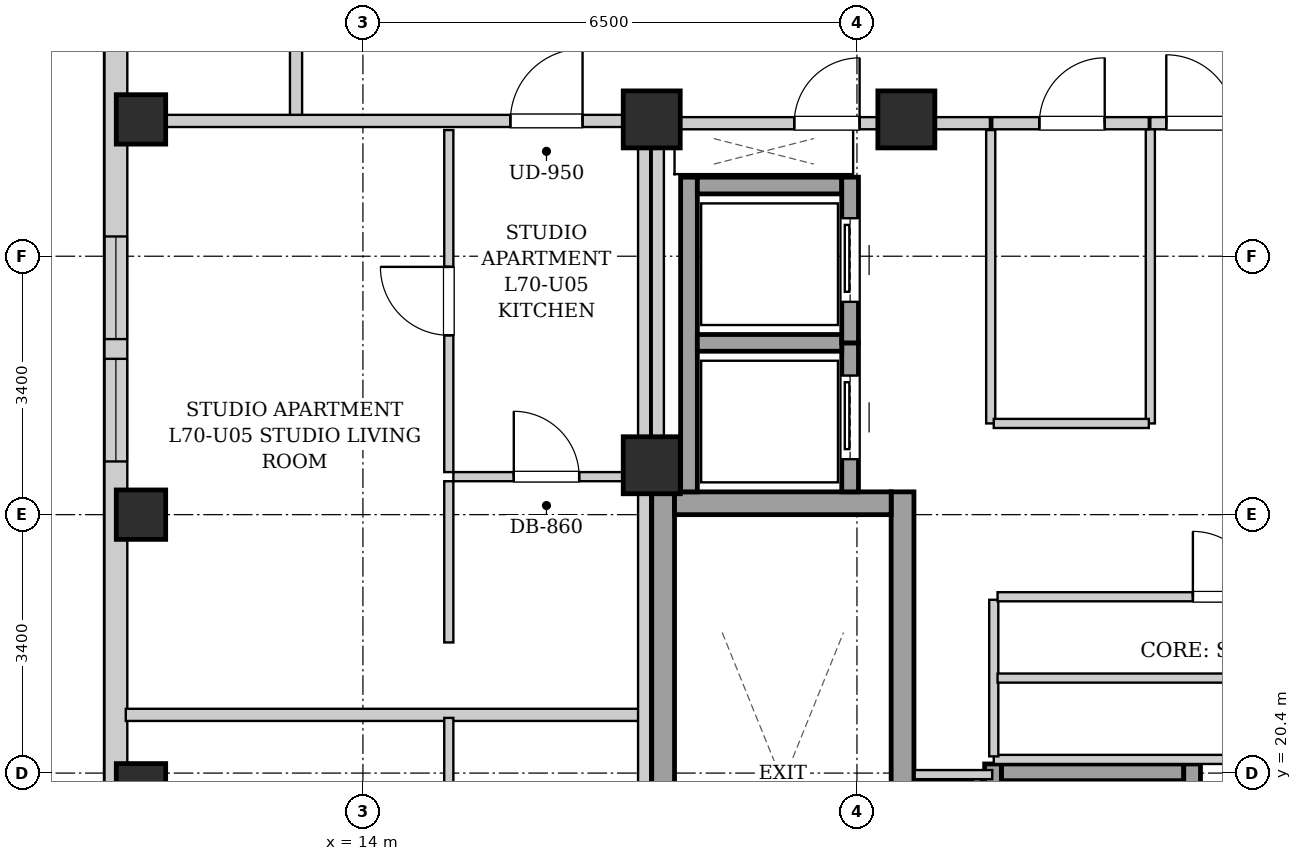
"""IFC4 building model, lengths in metres.
Left out: names, types, materials, properties, quantities, classifications, styles, units other than length and angle.
Written with IfcOpenShell. Run it as: python <this file> out.ifc"""

import sys

from ifc_helpers import new_model, si_unit, direction, frame, frame_2d, origin, origin_2d, place, context, subcontext, project, spatial, rectangle, extrude, element, fill, save


model = new_model("IFC4")
c1 = context("Model", 3, precision=1e-05, world=origin(), true_north=direction((0.0, 1.0)))
c2 = subcontext(c1, "Body", "Model", "MODEL_VIEW")
j1 = project(units=[si_unit("LENGTHUNIT", "METRE"), si_unit("PLANEANGLEUNIT", "RADIAN")], contexts=[c1])
p1 = place(None, origin())
s1 = spatial("IfcSite", under=j1, at=p1, CompositionType="ELEMENT")
p2 = place(p1, origin())
s2 = spatial("IfcBuilding", under=s1, at=p2, CompositionType="ELEMENT")
p3 = place(p2, frame((0.0, 0.0, 241.1)))
s3 = spatial("IfcBuildingStorey", under=s2, at=p3, CompositionType="ELEMENT", Elevation=241.1)
for number, where, z_axis, x_axis in (
    (1, (11.08, 20.2, 0.0), (0.0, 0.0, 1.0), (1.0, 0.0, 0.0)),
    (2, (11.08, 23.8, 0.0), (0.0, 0.0, 1.0), (1.0, 0.0, 0.0)),
    (3, (11.08, 29.0, 0.0), (0.0, 0.0, 1.0), (1.0, 0.0, 0.0)),
):
    element("IfcColumn", number, at=place(p3, frame(where, z_axis=z_axis, x_axis=x_axis)), inside=s3, PredefinedType="COLUMN", context=c2, shape_type="SweptSolid", body=[
        extrude(rectangle(XDim=0.65, YDim=0.65, at=origin_2d()), origin(), (0.0, 0.0, 1.0), 3.4),
    ])
for number, where, z_axis, x_axis in (
    (4, (17.8, 29.0, 0.0), (0.0, 0.0, 1.0), (1.0, 0.0, 0.0)),
    (5, (21.15, 29.0, 0.0), (0.0, 0.0, 1.0), (1.0, 0.0, 0.0)),
    (6, (17.8, 24.45, 0.0), (0.0, 0.0, 1.0), (1.0, 0.0, 0.0)),
):
    element("IfcColumn", number, at=place(p3, frame(where, z_axis=z_axis, x_axis=x_axis)), inside=s3, PredefinedType="COLUMN", context=c2, shape_type="SweptSolid", body=[
        extrude(rectangle(XDim=0.75, YDim=0.75, at=origin_2d()), origin(), (0.0, 0.0, 1.0), 3.4),
    ])
p4 = place(p3, frame((10.75, 6.3, 0.0), z_axis=(0.0, 0.0, 1.0), x_axis=(0.0, 1.0, 0.0)))
e7 = element("IfcWall", 7, at=p4, inside=s3, PredefinedType="SOLIDWALL", context=c2, shape_type="SweptSolid", body=[
    extrude(rectangle(XDim=31.4, YDim=0.3, at=frame_2d((15.7, 0.0))), origin(), (0.0, 0.0, 1.0), 3.14),
])
p5 = place(p4, frame((1.653, 0.0, 0.55)))
e8 = element("IfcOpeningElement", 8, at=p5, cuts=e7, PredefinedType="OPENING", context=c2, shape_type="SweptSolid", body=[
    extrude(rectangle(XDim=1.35, YDim=1.2, at=frame_2d((0.675, 0.6))), frame((0.0, 0.16, 0.0), z_axis=(0.0, -1.0, 0.0), x_axis=(1.0, 0.0, 0.0)), (0.0, 0.0, 1.0), 0.32),
])
p6 = place(p4, frame((11.194, 0.0, 0.55)))
e9 = element("IfcOpeningElement", 9, at=p6, cuts=e7, PredefinedType="OPENING", context=c2, shape_type="SweptSolid", body=[
    extrude(rectangle(XDim=1.35, YDim=1.2, at=frame_2d((0.675, 0.6))), frame((0.0, 0.16, 0.0), z_axis=(0.0, -1.0, 0.0), x_axis=(1.0, 0.0, 0.0)), (0.0, 0.0, 1.0), 0.32),
])
p7 = place(p4, frame((9.185, 0.0, 0.55)))
e10 = element("IfcOpeningElement", 10, at=p7, cuts=e7, PredefinedType="OPENING", context=c2, shape_type="SweptSolid", body=[
    extrude(rectangle(XDim=1.35, YDim=1.2, at=frame_2d((0.675, 0.6))), frame((0.0, 0.16, 0.0), z_axis=(0.0, -1.0, 0.0), x_axis=(1.0, 0.0, 0.0)), (0.0, 0.0, 1.0), 0.32),
])
p8 = place(p4, frame((18.2, 0.0, 0.55)))
e11 = element("IfcOpeningElement", 11, at=p8, cuts=e7, PredefinedType="OPENING", context=c2, shape_type="SweptSolid", body=[
    extrude(rectangle(XDim=1.35, YDim=1.2, at=frame_2d((0.675, 0.6))), frame((0.0, 0.16, 0.0), z_axis=(0.0, -1.0, 0.0), x_axis=(1.0, 0.0, 0.0)), (0.0, 0.0, 1.0), 0.32),
])
p9 = place(p4, frame((19.81, 0.0, 0.55)))
e12 = element("IfcOpeningElement", 12, at=p9, cuts=e7, PredefinedType="OPENING", context=c2, shape_type="SweptSolid", body=[
    extrude(rectangle(XDim=1.35, YDim=1.2, at=frame_2d((0.675, 0.6))), frame((0.0, 0.16, 0.0), z_axis=(0.0, -1.0, 0.0), x_axis=(1.0, 0.0, 0.0)), (0.0, 0.0, 1.0), 0.32),
])
for number, where, z_axis, x_axis in (
    (13, (17.95, 15.1, 0.0), (0.0, 0.0, 1.0), (0.0, 1.0, 0.0)),
    (14, (21.1, 15.1, 0.0), (0.0, 0.0, 1.0), (0.0, 1.0, 0.0)),
):
    element("IfcWall", number, at=place(p3, frame(where, z_axis=z_axis, x_axis=x_axis)), inside=s3, PredefinedType="SHEAR", context=c2, shape_type="SweptSolid", body=[
        extrude(rectangle(XDim=9.0, YDim=0.3, at=frame_2d((4.5, 0.0))), origin(), (0.0, 0.0, 1.0), 3.14),
    ])
p10 = place(p3, frame((18.1, 23.95, 0.0), z_axis=(0.0, 0.0, 1.0), x_axis=(1.0, 0.0, 0.0)))
e15 = element("IfcWall", 15, at=p10, inside=s3, PredefinedType="SHEAR", context=c2, shape_type="SweptSolid", body=[
    extrude(rectangle(XDim=2.85, YDim=0.3, at=frame_2d((1.425, 0.0))), origin(), (0.0, 0.0, 1.0), 3.14),
])
p11 = place(p3, frame((18.29, 24.1, 0.0), z_axis=(0.0, 0.0, 1.0), x_axis=(0.0, 1.0, 0.0)))
e16 = element("IfcWall", 16, at=p11, inside=s3, PredefinedType="SHEAR", context=c2, shape_type="SweptSolid", body=[
    extrude(rectangle(XDim=4.14, YDim=0.22, at=frame_2d((2.07, 0.0))), origin(), (0.0, 0.0, 1.0), 3.14),
])
p12 = place(p3, frame((20.41, 24.1, 0.0), z_axis=(0.0, 0.0, 1.0), x_axis=(0.0, 1.0, 0.0)))
e17 = element("IfcWall", 17, at=p12, inside=s3, PredefinedType="SHEAR", context=c2, shape_type="SweptSolid", body=[
    extrude(rectangle(XDim=1.96, YDim=0.22, at=frame_2d((0.98, 0.0))), origin(), (0.0, 0.0, 1.0), 3.14),
])
p13 = place(p12, frame((0.43, 0.0, 0.0)))
e18 = element("IfcOpeningElement", 18, at=p13, cuts=e17, PredefinedType="OPENING", context=c2, shape_type="SweptSolid", body=[
    extrude(rectangle(XDim=1.1, YDim=2.15, at=frame_2d((0.55, 1.075))), frame((0.0, 0.12, 0.0), z_axis=(0.0, -1.0, 0.0), x_axis=(1.0, 0.0, 0.0)), (0.0, 0.0, 1.0), 0.24),
])
for number, where, z_axis, x_axis in (
    (19, (18.4, 26.06, 0.0), (0.0, 0.0, 1.0), (1.0, 0.0, 0.0)),
    (20, (18.4, 28.13, 0.0), (0.0, 0.0, 1.0), (1.0, 0.0, 0.0)),
):
    element("IfcWall", number, at=place(p3, frame(where, z_axis=z_axis, x_axis=x_axis)), inside=s3, PredefinedType="SHEAR", context=c2, shape_type="SweptSolid", body=[
        extrude(rectangle(XDim=1.9, YDim=0.22, at=frame_2d((0.95, 0.0))), origin(), (0.0, 0.0, 1.0), 3.14),
    ])
p14 = place(p3, frame((20.41, 26.06, 0.0), z_axis=(0.0, 0.0, 1.0), x_axis=(0.0, 1.0, 0.0)))
e21 = element("IfcWall", 21, at=p14, inside=s3, PredefinedType="SHEAR", context=c2, shape_type="SweptSolid", body=[
    extrude(rectangle(XDim=2.18, YDim=0.22, at=frame_2d((1.09, 0.0))), origin(), (0.0, 0.0, 1.0), 3.14),
])
p15 = place(p14, frame((0.54, 0.0, 0.0)))
e22 = element("IfcOpeningElement", 22, at=p15, cuts=e21, PredefinedType="OPENING", context=c2, shape_type="SweptSolid", body=[
    extrude(rectangle(XDim=1.1, YDim=2.15, at=frame_2d((0.55, 1.075))), frame((0.0, 0.12, 0.0), z_axis=(0.0, -1.0, 0.0), x_axis=(1.0, 0.0, 0.0)), (0.0, 0.0, 1.0), 0.24),
])
p16 = place(p3, frame((22.4, 20.41, 0.0), z_axis=(0.0, 0.0, 1.0), x_axis=(1.0, 0.0, 0.0)))
e23 = element("IfcWall", 23, at=p16, inside=s3, PredefinedType="SHEAR", context=c2, shape_type="SweptSolid", body=[
    extrude(rectangle(XDim=2.4, YDim=0.22, at=frame_2d((1.2, 0.0))), origin(), (0.0, 0.0, 1.0), 3.14),
])
for number, where, z_axis, x_axis in (
    (24, (22.29, 17.98, 0.0), (0.0, 0.0, 1.0), (0.0, 1.0, 0.0)),
    (25, (24.91, 17.98, 0.0), (0.0, 0.0, 1.0), (0.0, 1.0, 0.0)),
):
    element("IfcWall", number, at=place(p3, frame(where, z_axis=z_axis, x_axis=x_axis)), inside=s3, PredefinedType="SHEAR", context=c2, shape_type="SweptSolid", body=[
        extrude(rectangle(XDim=2.54, YDim=0.22, at=frame_2d((1.27, 0.0))), origin(), (0.0, 0.0, 1.0), 3.14),
    ])
p17 = place(p3, frame((17.88, 24.12, 0.0), z_axis=(0.0, 0.0, 1.0), x_axis=(0.0, 1.0, 0.0)))
e26 = element("IfcWall", 26, at=p17, inside=s3, PredefinedType="PARTITIONING", context=c2, shape_type="SweptSolid", body=[
    extrude(rectangle(XDim=4.76, YDim=0.16, at=frame_2d((2.38, 0.0))), origin(), (0.0, 0.0, 1.0), 3.14),
])
p18 = place(p3, frame((24.36, 28.95, 0.0), z_axis=(0.0, 0.0, 1.0), x_axis=(1.0, 0.0, 0.0)))
e27 = element("IfcWall", 27, at=p18, inside=s3, PredefinedType="PARTITIONING", context=c2, shape_type="SweptSolid", body=[
    extrude(rectangle(XDim=1.32, YDim=0.16, at=frame_2d((0.66, 0.0))), origin(), (0.0, 0.0, 1.0), 2.668),
])
p19 = place(p18, frame((0.21, 0.0, 0.0)))
e28 = element("IfcOpeningElement", 28, at=p19, cuts=e27, PredefinedType="OPENING", context=c2, shape_type="SweptSolid", body=[
    extrude(rectangle(XDim=0.9, YDim=2.05, at=frame_2d((0.45, 1.025))), frame((0.0, 0.09, 0.0), z_axis=(0.0, -1.0, 0.0), x_axis=(1.0, 0.0, 0.0)), (0.0, 0.0, 1.0), 0.18),
])
p20 = place(p3, frame((17.96, 28.95, 0.0), z_axis=(0.0, 0.0, 1.0), x_axis=(1.0, 0.0, 0.0)))
e29 = element("IfcWall", 29, at=p20, inside=s3, PredefinedType="PARTITIONING", context=c2, shape_type="SweptSolid", body=[
    extrude(rectangle(XDim=4.29, YDim=0.16, at=frame_2d((2.145, 0.0))), origin(), (0.0, 0.0, 1.0), 2.668),
])
p21 = place(p20, frame((1.715, 0.0, 0.0)))
e30 = element("IfcOpeningElement", 30, at=p21, cuts=e29, PredefinedType="OPENING", context=c2, shape_type="SweptSolid", body=[
    extrude(rectangle(XDim=0.86, YDim=2.05, at=frame_2d((0.43, 1.025))), frame((0.0, 0.09, 0.0), z_axis=(0.0, -1.0, 0.0), x_axis=(1.0, 0.0, 0.0)), (0.0, 0.0, 1.0), 0.18),
])
p22 = place(p3, frame((22.08, 18.2, 0.0), z_axis=(0.0, 0.0, 1.0), x_axis=(0.0, 1.0, 0.0)))
e31 = element("IfcWall", 31, at=p22, inside=s3, PredefinedType="PARTITIONING", context=c2, shape_type="SweptSolid", body=[
    extrude(rectangle(XDim=2.12, YDim=0.12, at=frame_2d((1.06, 0.0))), origin(), (0.0, 0.0, 1.0), 3.14),
])
p23 = place(p3, frame((22.28, 20.38, 0.0), z_axis=(0.0, 0.0, 1.0), x_axis=(-1.0, 0.0, 0.0)))
e32 = element("IfcWall", 32, at=p23, inside=s3, PredefinedType="PARTITIONING", context=c2, shape_type="SweptSolid", body=[
    extrude(rectangle(XDim=1.02, YDim=0.12, at=frame_2d((0.51, 0.0))), origin(), (0.0, 0.0, 1.0), 3.14),
])
p24 = place(p3, frame((24.36, 25.0, 0.0), z_axis=(0.0, 0.0, 1.0), x_axis=(0.0, 1.0, 0.0)))
e33 = element("IfcWall", 33, at=p24, inside=s3, PredefinedType="PARTITIONING", context=c2, shape_type="SweptSolid", body=[
    extrude(rectangle(XDim=3.87, YDim=0.12, at=frame_2d((1.935, 0.0))), origin(), (0.0, 0.0, 1.0), 3.14),
])
p25 = place(p3, frame((22.26, 25.0, 0.0), z_axis=(0.0, 0.0, 1.0), x_axis=(0.0, 1.0, 0.0)))
e34 = element("IfcWall", 34, at=p25, inside=s3, PredefinedType="PARTITIONING", context=c2, shape_type="SweptSolid", body=[
    extrude(rectangle(XDim=3.86, YDim=0.12, at=frame_2d((1.93, 0.0))), origin(), (0.0, 0.0, 1.0), 3.14),
])
p26 = place(p3, frame((22.3, 25.0, 0.0), z_axis=(0.0, 0.0, 1.0), x_axis=(1.0, 0.0, 0.0)))
e35 = element("IfcWall", 35, at=p26, inside=s3, PredefinedType="PARTITIONING", context=c2, shape_type="SweptSolid", body=[
    extrude(rectangle(XDim=2.04, YDim=0.12, at=frame_2d((1.02, 0.0))), origin(), (0.0, 0.0, 1.0), 3.14),
])
p27 = place(p3, frame((22.28, 28.95, 0.0), z_axis=(0.0, 0.0, 1.0), x_axis=(1.0, 0.0, 0.0)))
e36 = element("IfcWall", 36, at=p27, inside=s3, PredefinedType="PARTITIONING", context=c2, shape_type="SweptSolid", body=[
    extrude(rectangle(XDim=2.06, YDim=0.16, at=frame_2d((1.03, 0.0))), origin(), (0.0, 0.0, 1.0), 2.668),
])
p28 = place(p27, frame((0.62, 0.0, 0.0)))
e37 = element("IfcOpeningElement", 37, at=p28, cuts=e36, PredefinedType="OPENING", context=c2, shape_type="SweptSolid", body=[
    extrude(rectangle(XDim=0.86, YDim=2.05, at=frame_2d((0.43, 1.025))), frame((0.0, 0.09, 0.0), z_axis=(0.0, -1.0, 0.0), x_axis=(1.0, 0.0, 0.0)), (0.0, 0.0, 1.0), 0.18),
])
p29 = place(p3, frame((22.3, 20.58, 0.0), z_axis=(0.0, 0.0, 1.0), x_axis=(1.0, 0.0, 0.0)))
e38 = element("IfcWall", 38, at=p29, inside=s3, PredefinedType="PARTITIONING", context=c2, shape_type="SweptSolid", body=[
    extrude(rectangle(XDim=7.35, YDim=0.12, at=frame_2d((3.675, 0.0))), origin(), (0.0, 0.0, 1.0), 3.14),
])
p30 = place(p3, frame((22.3, 20.62, 0.0), z_axis=(0.0, 0.0, 1.0), x_axis=(0.0, 1.0, 0.0)))
e39 = element("IfcWall", 39, at=p30, inside=s3, PredefinedType="PARTITIONING", context=c2, shape_type="SweptSolid", body=[
    extrude(rectangle(XDim=2.06, YDim=0.12, at=frame_2d((1.03, 0.0))), origin(), (0.0, 0.0, 1.0), 3.14),
])
p31 = place(p3, frame((22.35, 21.65, 0.0), z_axis=(0.0, 0.0, 1.0), x_axis=(1.0, 0.0, 0.0)))
e40 = element("IfcWall", 40, at=p31, inside=s3, PredefinedType="PARTITIONING", context=c2, shape_type="SweptSolid", body=[
    extrude(rectangle(XDim=5.79, YDim=0.12, at=frame_2d((2.895, 0.0))), origin(), (0.0, 0.0, 1.0), 3.14),
])
p32 = place(p3, frame((22.35, 22.72, 0.0), z_axis=(0.0, 0.0, 1.0), x_axis=(1.0, 0.0, 0.0)))
e41 = element("IfcWall", 41, at=p32, inside=s3, PredefinedType="PARTITIONING", context=c2, shape_type="SweptSolid", body=[
    extrude(rectangle(XDim=7.27, YDim=0.12, at=frame_2d((3.635, 0.0))), origin(), (0.0, 0.0, 1.0), 3.14),
])
p33 = place(p32, frame((2.57, 0.0, 0.0)))
e42 = element("IfcOpeningElement", 42, at=p33, cuts=e41, PredefinedType="OPENING", context=c2, shape_type="SweptSolid", body=[
    extrude(rectangle(XDim=0.86, YDim=2.05, at=frame_2d((0.43, 1.025))), frame((0.0, 0.07, 0.0), z_axis=(0.0, -1.0, 0.0), x_axis=(1.0, 0.0, 0.0)), (0.0, 0.0, 1.0), 0.14),
])
p34 = place(p32, frame((6.06, 0.0, 0.0)))
e43 = element("IfcOpeningElement", 43, at=p34, cuts=e41, PredefinedType="OPENING", context=c2, shape_type="SweptSolid", body=[
    extrude(rectangle(XDim=0.86, YDim=2.05, at=frame_2d((0.43, 1.025))), frame((0.0, 0.07, 0.0), z_axis=(0.0, -1.0, 0.0), x_axis=(1.0, 0.0, 0.0)), (0.0, 0.0, 1.0), 0.14),
])
p35 = place(p3, frame((13.12, 28.98, 0.0), z_axis=(0.0, 0.0, 1.0), x_axis=(0.0, 1.0, 0.0)))
e44 = element("IfcWall", 44, at=p35, inside=s3, PredefinedType="PARTITIONING", context=c2, shape_type="SweptSolid", body=[
    extrude(rectangle(XDim=1.58, YDim=0.16, at=frame_2d((0.79, 0.0))), origin(), (0.0, 0.0, 1.0), 3.14),
])
p36 = place(p3, frame((10.88, 21.166, 0.0), z_axis=(0.0, 0.0, 1.0), x_axis=(1.0, 0.0, 0.0)))
e45 = element("IfcWall", 45, at=p36, inside=s3, PredefinedType="PARTITIONING", context=c2, shape_type="SweptSolid", body=[
    extrude(rectangle(XDim=6.76, YDim=0.16, at=frame_2d((3.38, 0.0))), origin(), (0.0, 0.0, 1.0), 3.14),
])
p37 = place(p3, frame((15.13, 19.276, 0.0), z_axis=(0.0, 0.0, 1.0), x_axis=(0.0, 1.0, 0.0)))
e46 = element("IfcWall", 46, at=p37, inside=s3, PredefinedType="PARTITIONING", context=c2, shape_type="SweptSolid", body=[
    extrude(rectangle(XDim=1.85, YDim=0.12, at=frame_2d((0.925, 0.0))), origin(), (0.0, 0.0, 1.0), 3.14),
])
p38 = place(p3, frame((10.88, 28.98, 0.0), z_axis=(0.0, 0.0, 1.0), x_axis=(1.0, 0.0, 0.0)))
e47 = element("IfcWall", 47, at=p38, inside=s3, PredefinedType="PARTITIONING", context=c2, shape_type="SweptSolid", body=[
    extrude(rectangle(XDim=6.88, YDim=0.16, at=frame_2d((3.44, 0.0))), origin(), (0.0, 0.0, 1.0), 2.668),
])
p39 = place(p38, frame((5.06, 0.0, 0.0)))
e48 = element("IfcOpeningElement", 48, at=p39, cuts=e47, PredefinedType="OPENING", context=c2, shape_type="SweptSolid", body=[
    extrude(rectangle(XDim=0.95, YDim=2.1, at=frame_2d((0.475, 1.05))), frame((0.0, 0.09, 0.0), z_axis=(0.0, -1.0, 0.0), x_axis=(1.0, 0.0, 0.0)), (0.0, 0.0, 1.0), 0.18),
])
p40 = place(p3, frame((15.19, 24.3, 0.0), z_axis=(0.0, 0.0, 1.0), x_axis=(1.0, 0.0, 0.0)))
e49 = element("IfcWall", 49, at=p40, inside=s3, PredefinedType="PARTITIONING", context=c2, shape_type="SweptSolid", body=[
    extrude(rectangle(XDim=2.45, YDim=0.12, at=frame_2d((1.225, 0.0))), origin(), (0.0, 0.0, 1.0), 3.14),
])
p41 = place(p40, frame((0.795, 0.0, 0.0)))
e50 = element("IfcOpeningElement", 50, at=p41, cuts=e49, PredefinedType="OPENING", context=c2, shape_type="SweptSolid", body=[
    extrude(rectangle(XDim=0.86, YDim=2.05, at=frame_2d((0.43, 1.025))), frame((0.0, 0.07, 0.0), z_axis=(0.0, -1.0, 0.0), x_axis=(1.0, 0.0, 0.0)), (0.0, 0.0, 1.0), 0.14),
])
p42 = place(p3, frame((15.13, 22.119, 0.0), z_axis=(0.0, 0.0, 1.0), x_axis=(0.0, 1.0, 0.0)))
e51 = element("IfcWall", 51, at=p42, inside=s3, PredefinedType="PARTITIONING", context=c2, shape_type="SweptSolid", body=[
    extrude(rectangle(XDim=2.121, YDim=0.12, at=frame_2d((1.061, 0.0))), origin(), (0.0, 0.0, 1.0), 3.14),
])
p43 = place(p3, frame((15.13, 24.36, 0.0), z_axis=(0.0, 0.0, 1.0), x_axis=(0.0, 1.0, 0.0)))
e52 = element("IfcWall", 52, at=p43, inside=s3, PredefinedType="PARTITIONING", context=c2, shape_type="SweptSolid", body=[
    extrude(rectangle(XDim=4.5, YDim=0.12, at=frame_2d((2.25, 0.0))), origin(), (0.0, 0.0, 1.0), 3.14),
])
p44 = place(p43, frame((1.8, 0.0, 0.0)))
e53 = element("IfcOpeningElement", 53, at=p44, cuts=e52, PredefinedType="OPENING", context=c2, shape_type="SweptSolid", body=[
    extrude(rectangle(XDim=0.9, YDim=2.05, at=frame_2d((0.45, 1.025))), frame((0.0, 0.07, 0.0), z_axis=(0.0, -1.0, 0.0), x_axis=(1.0, 0.0, 0.0)), (0.0, 0.0, 1.0), 0.14),
])
p45 = place(p3, frame((17.7, 15.02, 0.0), z_axis=(0.0, 0.0, 1.0), x_axis=(0.0, 1.0, 0.0)))
e54 = element("IfcWall", 54, at=p45, inside=s3, PredefinedType="PARTITIONING", context=c2, shape_type="SweptSolid", body=[
    extrude(rectangle(XDim=13.98, YDim=0.16, at=frame_2d((6.99, 0.0))), origin(), (0.0, 0.0, 1.0), 3.14),
])
p46 = place(p13, origin())
e55 = element("IfcDoor", 55, at=p46, inside=s3, OperationType="SLIDING_TO_LEFT", PredefinedType="DOOR", context=c2, shape_type="SweptSolid", body=[
    extrude(rectangle(XDim=1.1, YDim=2.15, at=frame_2d((0.55, 1.075))), frame((0.0, 0.025, 0.0), z_axis=(0.0, -1.0, 0.0), x_axis=(1.0, 0.0, 0.0)), (0.0, 0.0, 1.0), 0.05),
])
fill(e18, e55)
p47 = place(p15, origin())
e56 = element("IfcDoor", 56, at=p47, inside=s3, OperationType="SLIDING_TO_LEFT", PredefinedType="DOOR", context=c2, shape_type="SweptSolid", body=[
    extrude(rectangle(XDim=1.1, YDim=2.15, at=frame_2d((0.55, 1.075))), frame((0.0, 0.025, 0.0), z_axis=(0.0, -1.0, 0.0), x_axis=(1.0, 0.0, 0.0)), (0.0, 0.0, 1.0), 0.05),
])
fill(e22, e56)
p48 = place(p19, origin())
e57 = element("IfcDoor", 57, at=p48, inside=s3, OperationType="SINGLE_SWING_LEFT", PredefinedType="DOOR", context=c2, shape_type="SweptSolid", body=[
    extrude(rectangle(XDim=0.9, YDim=2.05, at=frame_2d((0.45, 1.025))), frame((0.0, 0.025, 0.0), z_axis=(0.0, -1.0, 0.0), x_axis=(1.0, 0.0, 0.0)), (0.0, 0.0, 1.0), 0.05),
])
fill(e28, e57)
p49 = place(p21, origin())
e58 = element("IfcDoor", 58, at=p49, inside=s3, OperationType="SINGLE_SWING_RIGHT", PredefinedType="DOOR", context=c2, shape_type="SweptSolid", body=[
    extrude(rectangle(XDim=0.86, YDim=2.05, at=frame_2d((0.43, 1.025))), frame((0.0, 0.025, 0.0), z_axis=(0.0, -1.0, 0.0), x_axis=(1.0, 0.0, 0.0)), (0.0, 0.0, 1.0), 0.05),
])
fill(e30, e58)
p50 = place(p28, origin())
e59 = element("IfcDoor", 59, at=p50, inside=s3, OperationType="SINGLE_SWING_RIGHT", PredefinedType="DOOR", context=c2, shape_type="SweptSolid", body=[
    extrude(rectangle(XDim=0.86, YDim=2.05, at=frame_2d((0.43, 1.025))), frame((0.0, 0.025, 0.0), z_axis=(0.0, -1.0, 0.0), x_axis=(1.0, 0.0, 0.0)), (0.0, 0.0, 1.0), 0.05),
])
fill(e37, e59)
p51 = place(p33, origin())
e60 = element("IfcDoor", 60, at=p51, inside=s3, OperationType="SINGLE_SWING_LEFT", PredefinedType="DOOR", context=c2, shape_type="SweptSolid", body=[
    extrude(rectangle(XDim=0.86, YDim=2.05, at=frame_2d((0.43, 1.025))), frame((0.0, 0.025, 0.0), z_axis=(0.0, -1.0, 0.0), x_axis=(1.0, 0.0, 0.0)), (0.0, 0.0, 1.0), 0.05),
])
fill(e42, e60)
p52 = place(p39, origin())
e61 = element("IfcDoor", 61, at=p52, inside=s3, OperationType="SINGLE_SWING_RIGHT", PredefinedType="DOOR", context=c2, shape_type="SweptSolid", body=[
    extrude(rectangle(XDim=0.95, YDim=2.1, at=frame_2d((0.475, 1.05))), frame((0.0, 0.025, 0.0), z_axis=(0.0, -1.0, 0.0), x_axis=(1.0, 0.0, 0.0)), (0.0, 0.0, 1.0), 0.05),
])
fill(e48, e61)
p53 = place(p41, origin())
e62 = element("IfcDoor", 62, at=p53, inside=s3, OperationType="SINGLE_SWING_LEFT", PredefinedType="DOOR", context=c2, shape_type="SweptSolid", body=[
    extrude(rectangle(XDim=0.86, YDim=2.05, at=frame_2d((0.43, 1.025))), frame((0.0, 0.025, 0.0), z_axis=(0.0, -1.0, 0.0), x_axis=(1.0, 0.0, 0.0)), (0.0, 0.0, 1.0), 0.05),
])
fill(e50, e62)
p54 = place(p44, origin())
e63 = element("IfcDoor", 63, at=p54, inside=s3, OperationType="SINGLE_SWING_RIGHT", PredefinedType="DOOR", context=c2, shape_type="SweptSolid", body=[
    extrude(rectangle(XDim=0.9, YDim=2.05, at=frame_2d((0.45, 1.025))), frame((0.0, 0.025, 0.0), z_axis=(0.0, -1.0, 0.0), x_axis=(1.0, 0.0, 0.0)), (0.0, 0.0, 1.0), 0.05),
])
fill(e53, e63)
p55 = place(p8, origin())
e64 = element("IfcWindow", 64, at=p55, inside=s3, PartitioningType="SINGLE_PANEL", PredefinedType="WINDOW", context=c2, shape_type="SweptSolid", body=[
    extrude(rectangle(XDim=1.35, YDim=1.2, at=frame_2d((0.675, 0.6))), frame((0.0, 0.03, 0.0), z_axis=(0.0, -1.0, 0.0), x_axis=(1.0, 0.0, 0.0)), (0.0, 0.0, 1.0), 0.06),
])
fill(e11, e64)
p56 = place(p9, origin())
e65 = element("IfcWindow", 65, at=p56, inside=s3, PartitioningType="SINGLE_PANEL", PredefinedType="WINDOW", context=c2, shape_type="SweptSolid", body=[
    extrude(rectangle(XDim=1.35, YDim=1.2, at=frame_2d((0.675, 0.6))), frame((0.0, 0.03, 0.0), z_axis=(0.0, -1.0, 0.0), x_axis=(1.0, 0.0, 0.0)), (0.0, 0.0, 1.0), 0.06),
])
fill(e12, e65)
save(model, sys.argv[1])
